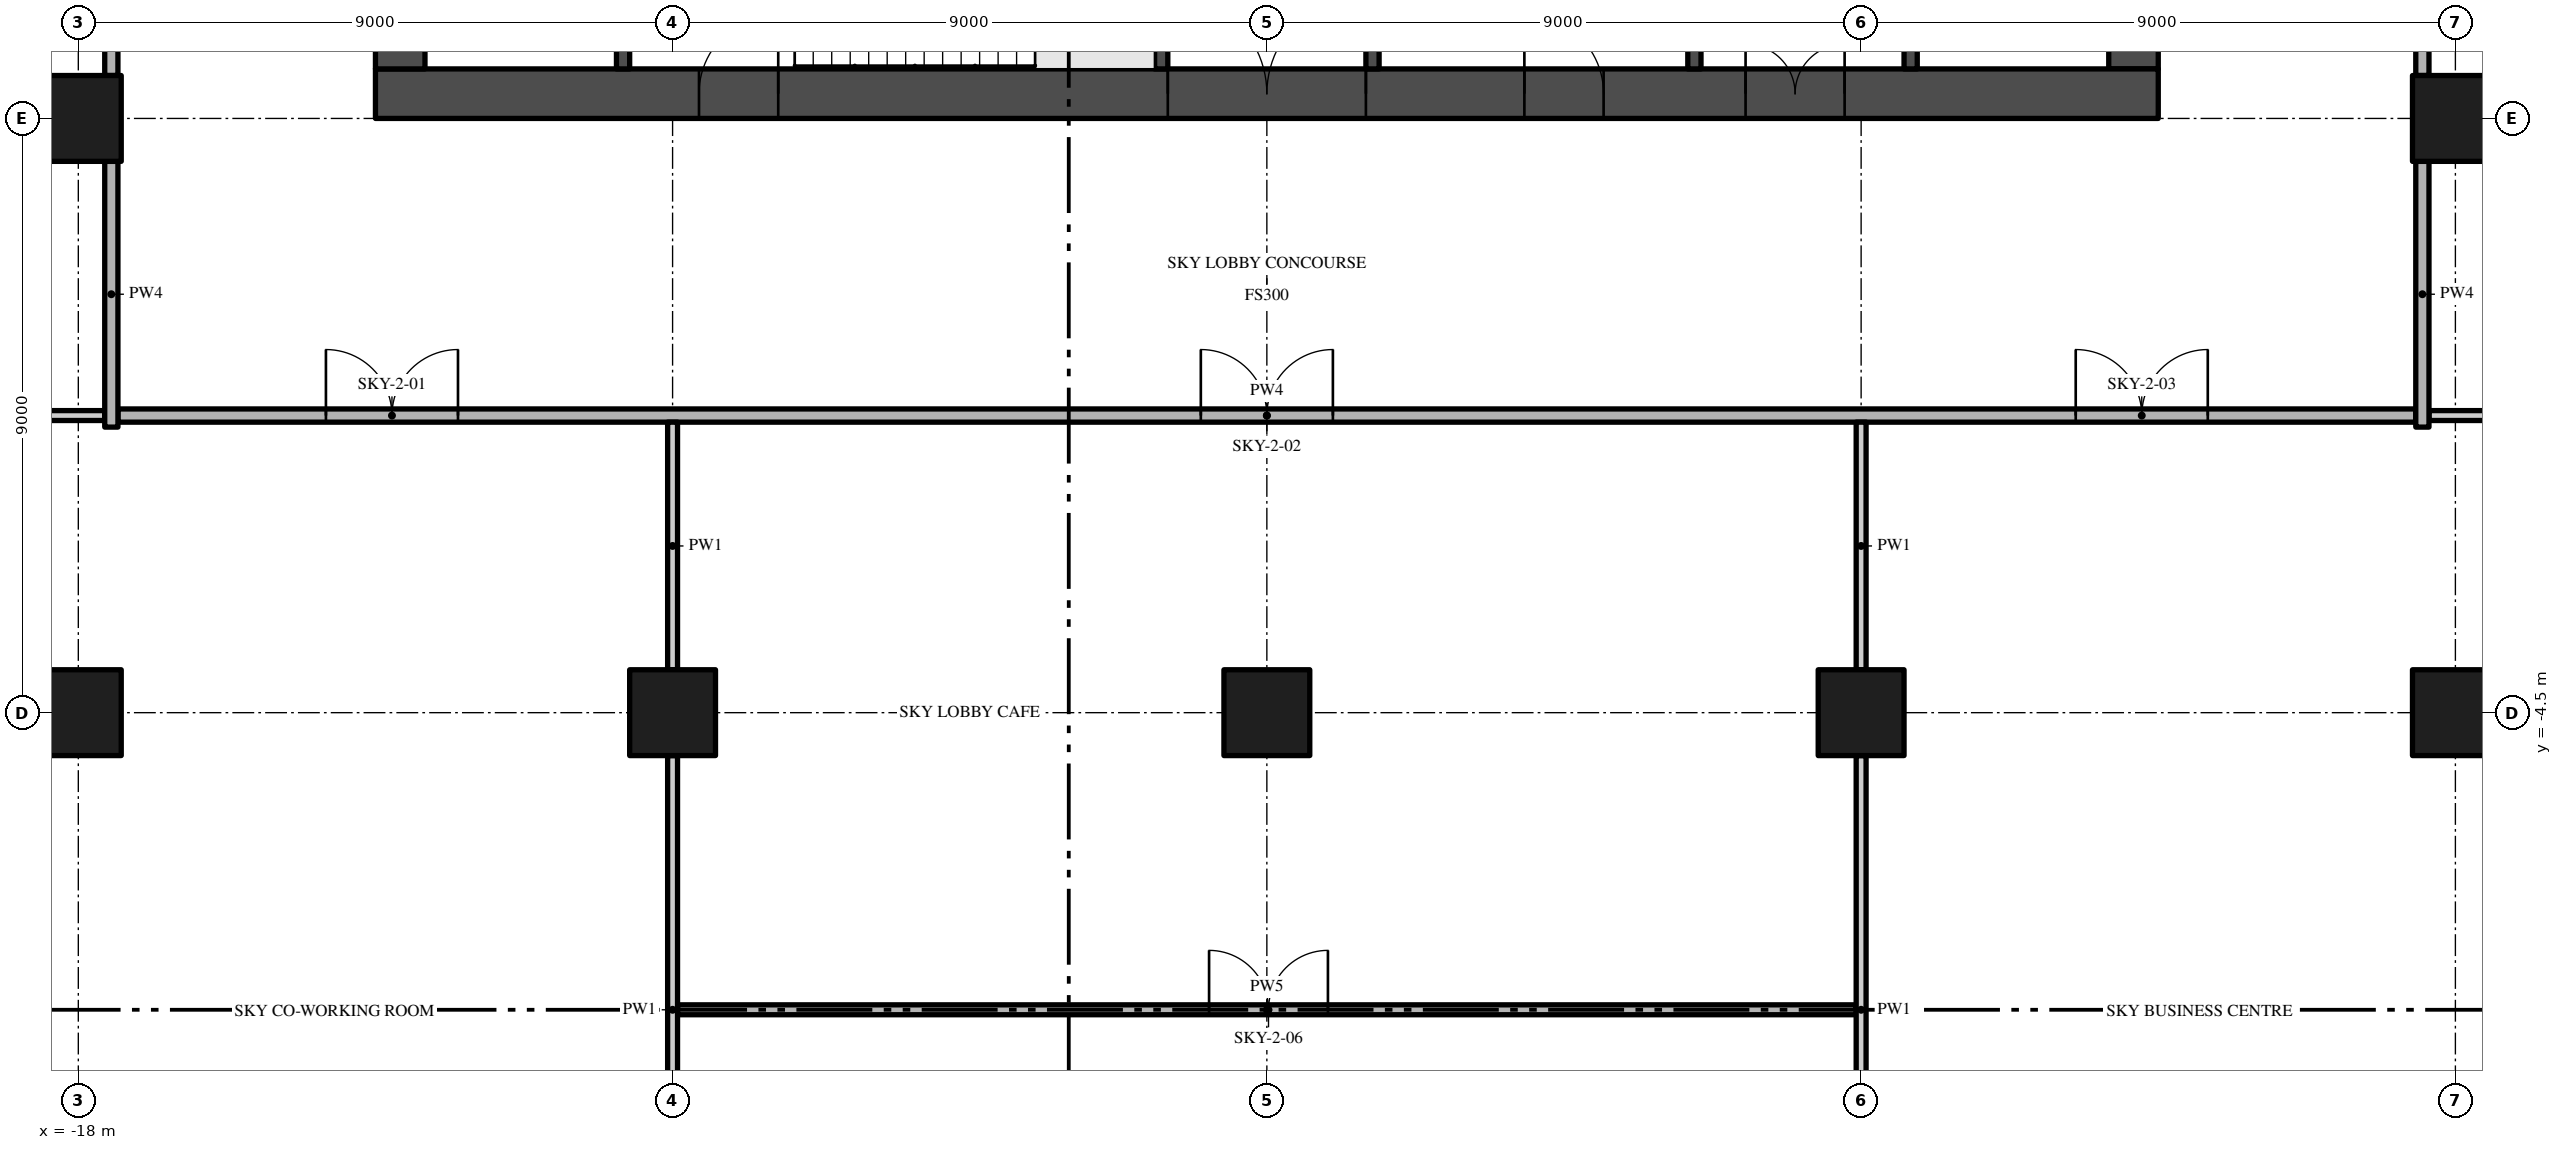
"""IFC4 building model, lengths in metres.
Left out: names, types, materials, properties, quantities, classifications, styles, units other than length and angle.
Written with IfcOpenShell. Run it as: python <this file> out.ifc"""

import sys

from ifc_helpers import new_model, si_unit, direction, frame, frame_2d, origin, origin_2d, place, context, subcontext, project, spatial, rectangle, extrude, element, fill, save


model = new_model("IFC4")
c1 = context("Model", 3, precision=1e-05, world=origin(), true_north=direction((0.0, 1.0)))
c2 = subcontext(c1, "Body", "Model", "MODEL_VIEW")
j1 = project(units=[si_unit("LENGTHUNIT", "METRE"), si_unit("PLANEANGLEUNIT", "RADIAN")], contexts=[c1])
p1 = place(None, origin())
s1 = spatial("IfcSite", under=j1, at=p1, CompositionType="ELEMENT")
p2 = place(p1, origin())
s2 = spatial("IfcBuilding", under=s1, at=p2, CompositionType="ELEMENT")
p3 = place(p2, frame((0.0, 0.0, 120.0)))
s3 = spatial("IfcBuildingStorey", under=s2, at=p3, CompositionType="ELEMENT", Elevation=120.0)
p4 = place(p3, frame((-13.5, 4.875, -0.3), z_axis=(0.0, 0.0, 1.0), x_axis=(1.0, 0.0, 0.0)))
e1 = element("IfcWall", 1, at=p4, inside=s3, PredefinedType="SHEAR", context=c2, shape_type="SweptSolid", body=[
    extrude(rectangle(XDim=27.0, YDim=0.75, at=frame_2d((13.5, 0.0))), origin(), (0.0, 0.0, 1.0), 5.0),
])
p5 = place(p4, frame((12.0, 0.0, 0.3)))
e2 = element("IfcOpeningElement", 2, at=p5, cuts=e1, PredefinedType="OPENING", context=c2, shape_type="SweptSolid", body=[
    extrude(rectangle(XDim=3.0, YDim=2.4, at=frame_2d((1.5, 1.2))), frame((0.0, 0.385, 0.0), z_axis=(0.0, -1.0, 0.0), x_axis=(1.0, 0.0, 0.0)), (0.0, 0.0, 1.0), 0.77),
])
p6 = place(p4, frame((4.9, 0.0, 0.3)))
e3 = element("IfcOpeningElement", 3, at=p6, cuts=e1, PredefinedType="OPENING", context=c2, shape_type="SweptSolid", body=[
    extrude(rectangle(XDim=1.2, YDim=2.2, at=frame_2d((0.6, 1.1))), frame((0.0, 0.385, 0.0), z_axis=(0.0, -1.0, 0.0), x_axis=(1.0, 0.0, 0.0)), (0.0, 0.0, 1.0), 0.77),
])
p7 = place(p4, frame((20.75, 0.0, 0.3)))
e4 = element("IfcOpeningElement", 4, at=p7, cuts=e1, PredefinedType="OPENING", context=c2, shape_type="SweptSolid", body=[
    extrude(rectangle(XDim=1.5, YDim=2.2, at=frame_2d((0.75, 1.1))), frame((0.0, 0.385, 0.0), z_axis=(0.0, -1.0, 0.0), x_axis=(1.0, 0.0, 0.0)), (0.0, 0.0, 1.0), 0.77),
])
p8 = place(p4, frame((17.4, 0.0, 0.3)))
e5 = element("IfcOpeningElement", 5, at=p8, cuts=e1, PredefinedType="OPENING", context=c2, shape_type="SweptSolid", body=[
    extrude(rectangle(XDim=1.2, YDim=2.2, at=frame_2d((0.6, 1.1))), frame((0.0, 0.385, 0.0), z_axis=(0.0, -1.0, 0.0), x_axis=(1.0, 0.0, 0.0)), (0.0, 0.0, 1.0), 0.77),
])
p9 = place(p3, frame((13.125, 5.25, -0.3), z_axis=(0.0, 0.0, 1.0), x_axis=(0.0, 1.0, 0.0)))
e6 = element("IfcWall", 6, at=p9, inside=s3, PredefinedType="SHEAR", context=c2, shape_type="SweptSolid", body=[
    extrude(rectangle(XDim=16.5, YDim=0.75, at=frame_2d((8.25, 0.0))), origin(), (0.0, 0.0, 1.0), 5.0),
])
p10 = place(p9, frame((6.15, 0.0, 0.3)))
e7 = element("IfcOpeningElement", 7, at=p10, cuts=e6, PredefinedType="OPENING", context=c2, shape_type="SweptSolid", body=[
    extrude(rectangle(XDim=1.2, YDim=2.2, at=frame_2d((0.6, 1.1))), frame((0.0, 0.385, 0.0), z_axis=(0.0, -1.0, 0.0), x_axis=(1.0, 0.0, 0.0)), (0.0, 0.0, 1.0), 0.77),
])
p11 = place(p3, frame((-13.125, 21.75, -0.3), z_axis=(0.0, 0.0, 1.0), x_axis=(0.0, -1.0, 0.0)))
e8 = element("IfcWall", 8, at=p11, inside=s3, PredefinedType="SHEAR", context=c2, shape_type="SweptSolid", body=[
    extrude(rectangle(XDim=16.5, YDim=0.75, at=frame_2d((8.25, 0.0))), origin(), (0.0, 0.0, 1.0), 5.0),
])
p12 = place(p11, frame((9.15, 0.0, 0.3)))
e9 = element("IfcOpeningElement", 9, at=p12, cuts=e8, PredefinedType="OPENING", context=c2, shape_type="SweptSolid", body=[
    extrude(rectangle(XDim=1.2, YDim=2.2, at=frame_2d((0.6, 1.1))), frame((0.0, 0.385, 0.0), z_axis=(0.0, -1.0, 0.0), x_axis=(1.0, 0.0, 0.0)), (0.0, 0.0, 1.0), 0.77),
])
for number, where, z_axis, x_axis in (
    (10, (-18.0, -4.5, 0.0), (0.0, 0.0, 1.0), (1.0, 0.0, 0.0)),
    (11, (-18.0, 4.5, 0.0), (0.0, 0.0, 1.0), (1.0, 0.0, 0.0)),
    (12, (-9.0, -4.5, 0.0), (0.0, 0.0, 1.0), (1.0, 0.0, 0.0)),
    (13, (0.0, -4.5, 0.0), (0.0, 0.0, 1.0), (1.0, 0.0, 0.0)),
    (14, (18.0, -4.5, 0.0), (0.0, 0.0, 1.0), (1.0, 0.0, 0.0)),
    (15, (18.0, 4.5, 0.0), (0.0, 0.0, 1.0), (1.0, 0.0, 0.0)),
    (16, (9.0, -4.5, 0.0), (0.0, 0.0, 1.0), (1.0, 0.0, 0.0)),
):
    element("IfcColumn", number, at=place(p3, frame(where, z_axis=z_axis, x_axis=x_axis)), inside=s3, PredefinedType="COLUMN", context=c2, shape_type="SweptSolid", body=[
        extrude(rectangle(XDim=1.3, YDim=1.3, at=origin_2d()), origin(), (0.0, 0.0, 1.0), 4.7),
    ])
for number, where, z_axis, x_axis in (
    (17, (-9.75, 5.25, 0.0), (0.0, 0.0, 1.0), (0.0, 1.0, 0.0)),
    (18, (-1.6, 5.25, 0.0), (0.0, 0.0, 1.0), (0.0, 1.0, 0.0)),
):
    element("IfcWall", number, at=place(p3, frame(where, z_axis=z_axis, x_axis=x_axis)), inside=s3, PredefinedType="SHEAR", context=c2, shape_type="SweptSolid", body=[
        extrude(rectangle(XDim=2.7, YDim=0.2, at=frame_2d((1.35, 0.0))), origin(), (0.0, 0.0, 1.0), 4.7),
    ])
p13 = place(p3, frame((1.6, 9.2, 0.0), z_axis=(0.0, 0.0, 1.0), x_axis=(0.0, -1.0, 0.0)))
e19 = element("IfcWall", 19, at=p13, inside=s3, PredefinedType="SHEAR", context=c2, shape_type="SweptSolid", body=[
    extrude(rectangle(XDim=3.95, YDim=0.2, at=frame_2d((1.975, 0.0))), origin(), (0.0, 0.0, 1.0), 4.7),
])
p14 = place(p13, frame((1.125, 0.0, 0.0)))
e20 = element("IfcOpeningElement", 20, at=p14, cuts=e19, PredefinedType="OPENING", context=c2, shape_type="SweptSolid", body=[
    extrude(rectangle(XDim=0.9, YDim=2.1, at=frame_2d((0.45, 1.05))), frame((0.0, 0.11, 0.0), z_axis=(0.0, -1.0, 0.0), x_axis=(1.0, 0.0, 0.0)), (0.0, 0.0, 1.0), 0.22),
])
p15 = place(p3, frame((6.475, 5.25, 0.0), z_axis=(0.0, 0.0, 1.0), x_axis=(0.0, 1.0, 0.0)))
e21 = element("IfcWall", 21, at=p15, inside=s3, PredefinedType="SHEAR", context=c2, shape_type="SweptSolid", body=[
    extrude(rectangle(XDim=3.95, YDim=0.2, at=frame_2d((1.975, 0.0))), origin(), (0.0, 0.0, 1.0), 4.7),
])
p16 = place(p3, frame((9.75, 5.25, 0.0), z_axis=(0.0, 0.0, 1.0), x_axis=(0.0, 1.0, 0.0)))
e22 = element("IfcWall", 22, at=p16, inside=s3, PredefinedType="SHEAR", context=c2, shape_type="SweptSolid", body=[
    extrude(rectangle(XDim=2.35, YDim=0.2, at=frame_2d((1.175, 0.0))), origin(), (0.0, 0.0, 1.0), 4.7),
])
p17 = place(p16, frame((0.7, 0.0, 0.0)))
e23 = element("IfcOpeningElement", 23, at=p17, cuts=e22, PredefinedType="OPENING", context=c2, shape_type="SweptSolid", body=[
    extrude(rectangle(XDim=1.1, YDim=2.1, at=frame_2d((0.55, 1.05))), frame((0.0, 0.11, 0.0), z_axis=(0.0, -1.0, 0.0), x_axis=(1.0, 0.0, 0.0)), (0.0, 0.0, 1.0), 0.22),
])
p18 = place(p3, frame((-8.925, -9.0, 0.0), z_axis=(0.0, 0.0, 1.0), x_axis=(1.0, 0.0, 0.0)))
e24 = element("IfcWall", 24, at=p18, inside=s3, PredefinedType="PARTITIONING", context=c2, shape_type="SweptSolid", body=[
    extrude(rectangle(XDim=17.85, YDim=0.15, at=frame_2d((8.925, 0.0))), origin(), (0.0, 0.0, 1.0), 4.7),
])
p19 = place(p18, frame((8.05, 0.0, 0.0)))
e25 = element("IfcOpeningElement", 25, at=p19, cuts=e24, PredefinedType="OPENING", context=c2, shape_type="SweptSolid", body=[
    extrude(rectangle(XDim=1.8, YDim=2.4, at=frame_2d((0.9, 1.2))), frame((0.0, 0.085, 0.0), z_axis=(0.0, -1.0, 0.0), x_axis=(1.0, 0.0, 0.0)), (0.0, 0.0, 1.0), 0.17),
])
p20 = place(p3, frame((-17.4, 0.0, 0.0), z_axis=(0.0, 0.0, 1.0), x_axis=(1.0, 0.0, 0.0)))
e26 = element("IfcWall", 26, at=p20, inside=s3, PredefinedType="PARTITIONING", context=c2, shape_type="SweptSolid", body=[
    extrude(rectangle(XDim=34.8, YDim=0.2, at=frame_2d((17.4, 0.0))), origin(), (0.0, 0.0, 1.0), 4.7),
])
p21 = place(p20, frame((3.15, 0.0, 0.0)))
e27 = element("IfcOpeningElement", 27, at=p21, cuts=e26, PredefinedType="OPENING", context=c2, shape_type="SweptSolid", body=[
    extrude(rectangle(XDim=2.0, YDim=2.4, at=frame_2d((1.0, 1.2))), frame((0.0, 0.11, 0.0), z_axis=(0.0, -1.0, 0.0), x_axis=(1.0, 0.0, 0.0)), (0.0, 0.0, 1.0), 0.22),
])
p22 = place(p20, frame((16.4, 0.0, 0.0)))
e28 = element("IfcOpeningElement", 28, at=p22, cuts=e26, PredefinedType="OPENING", context=c2, shape_type="SweptSolid", body=[
    extrude(rectangle(XDim=2.0, YDim=2.4, at=frame_2d((1.0, 1.2))), frame((0.0, 0.11, 0.0), z_axis=(0.0, -1.0, 0.0), x_axis=(1.0, 0.0, 0.0)), (0.0, 0.0, 1.0), 0.22),
])
p23 = place(p20, frame((29.65, 0.0, 0.0)))
e29 = element("IfcOpeningElement", 29, at=p23, cuts=e26, PredefinedType="OPENING", context=c2, shape_type="SweptSolid", body=[
    extrude(rectangle(XDim=2.0, YDim=2.4, at=frame_2d((1.0, 1.2))), frame((0.0, 0.11, 0.0), z_axis=(0.0, -1.0, 0.0), x_axis=(1.0, 0.0, 0.0)), (0.0, 0.0, 1.0), 0.22),
])
for number, where, z_axis, x_axis in (
    (30, (-22.2, 0.0, 0.0), (0.0, 0.0, 1.0), (1.0, 0.0, 0.0)),
    (31, (17.6, 0.0, 0.0), (0.0, 0.0, 1.0), (1.0, 0.0, 0.0)),
):
    element("IfcWall", number, at=place(p3, frame(where, z_axis=z_axis, x_axis=x_axis)), inside=s3, PredefinedType="PARTITIONING", context=c2, shape_type="SweptSolid", body=[
        extrude(rectangle(XDim=4.6, YDim=0.15, at=frame_2d((2.3, 0.0))), origin(), (0.0, 0.0, 1.0), 4.7),
    ])
p24 = place(p3, frame((-17.5, -0.175, 0.0), z_axis=(0.0, 0.0, 1.0), x_axis=(0.0, 1.0, 0.0)))
e32 = element("IfcWall", 32, at=p24, inside=s3, PredefinedType="PARTITIONING", context=c2, shape_type="SweptSolid", body=[
    extrude(rectangle(XDim=4.025, YDim=0.2, at=frame_2d((2.013, 0.0))), origin(), (0.0, 0.0, 1.0), 4.7),
])
p25 = place(p3, frame((-17.5, 12.85, 0.0), z_axis=(0.0, 0.0, 1.0), x_axis=(0.0, -1.0, 0.0)))
e33 = element("IfcWall", 33, at=p25, inside=s3, PredefinedType="PARTITIONING", context=c2, shape_type="SweptSolid", body=[
    extrude(rectangle(XDim=7.7, YDim=0.2, at=frame_2d((3.85, 0.0))), origin(), (0.0, 0.0, 1.0), 4.7),
])
p26 = place(p25, frame((0.15, 0.0, 0.0)))
e34 = element("IfcOpeningElement", 34, at=p26, cuts=e33, PredefinedType="OPENING", context=c2, shape_type="SweptSolid", body=[
    extrude(rectangle(XDim=1.8, YDim=2.4, at=frame_2d((0.9, 1.2))), frame((0.0, 0.11, 0.0), z_axis=(0.0, -1.0, 0.0), x_axis=(1.0, 0.0, 0.0)), (0.0, 0.0, 1.0), 0.22),
])
p27 = place(p3, frame((-9.0, -12.85, 0.0), z_axis=(0.0, 0.0, 1.0), x_axis=(0.0, 1.0, 0.0)))
e35 = element("IfcWall", 35, at=p27, inside=s3, PredefinedType="PARTITIONING", context=c2, shape_type="SweptSolid", body=[
    extrude(rectangle(XDim=7.7, YDim=0.15, at=frame_2d((3.85, 0.0))), origin(), (0.0, 0.0, 1.0), 4.7),
])
p28 = place(p3, frame((-9.0, -3.85, 0.0), z_axis=(0.0, 0.0, 1.0), x_axis=(0.0, 1.0, 0.0)))
e36 = element("IfcWall", 36, at=p28, inside=s3, PredefinedType="PARTITIONING", context=c2, shape_type="SweptSolid", body=[
    extrude(rectangle(XDim=3.75, YDim=0.15, at=frame_2d((1.875, 0.0))), origin(), (0.0, 0.0, 1.0), 4.7),
])
p29 = place(p3, frame((9.0, -12.85, 0.0), z_axis=(0.0, 0.0, 1.0), x_axis=(0.0, 1.0, 0.0)))
e37 = element("IfcWall", 37, at=p29, inside=s3, PredefinedType="PARTITIONING", context=c2, shape_type="SweptSolid", body=[
    extrude(rectangle(XDim=7.7, YDim=0.15, at=frame_2d((3.85, 0.0))), origin(), (0.0, 0.0, 1.0), 4.7),
])
p30 = place(p3, frame((9.0, -3.85, 0.0), z_axis=(0.0, 0.0, 1.0), x_axis=(0.0, 1.0, 0.0)))
e38 = element("IfcWall", 38, at=p30, inside=s3, PredefinedType="PARTITIONING", context=c2, shape_type="SweptSolid", body=[
    extrude(rectangle(XDim=3.75, YDim=0.15, at=frame_2d((1.875, 0.0))), origin(), (0.0, 0.0, 1.0), 4.7),
])
p31 = place(p3, frame((17.5, -0.175, 0.0), z_axis=(0.0, 0.0, 1.0), x_axis=(0.0, 1.0, 0.0)))
e39 = element("IfcWall", 39, at=p31, inside=s3, PredefinedType="PARTITIONING", context=c2, shape_type="SweptSolid", body=[
    extrude(rectangle(XDim=4.025, YDim=0.2, at=frame_2d((2.013, 0.0))), origin(), (0.0, 0.0, 1.0), 4.7),
])
p32 = place(p3, frame((17.5, 5.15, 0.0), z_axis=(0.0, 0.0, 1.0), x_axis=(0.0, 1.0, 0.0)))
e40 = element("IfcWall", 40, at=p32, inside=s3, PredefinedType="PARTITIONING", context=c2, shape_type="SweptSolid", body=[
    extrude(rectangle(XDim=7.7, YDim=0.2, at=frame_2d((3.85, 0.0))), origin(), (0.0, 0.0, 1.0), 4.7),
])
p33 = place(p32, frame((5.75, 0.0, 0.0)))
e41 = element("IfcOpeningElement", 41, at=p33, cuts=e40, PredefinedType="OPENING", context=c2, shape_type="SweptSolid", body=[
    extrude(rectangle(XDim=1.8, YDim=2.4, at=frame_2d((0.9, 1.2))), frame((0.0, 0.11, 0.0), z_axis=(0.0, -1.0, 0.0), x_axis=(1.0, 0.0, 0.0)), (0.0, 0.0, 1.0), 0.22),
])
p34 = place(p5, frame((3.0, 0.0, 0.0), z_axis=(0.0, 0.0, 1.0), x_axis=(-1.0, 0.0, 0.0)))
e42 = element("IfcDoor", 42, at=p34, inside=s3, OperationType="DOUBLE_DOOR_SINGLE_SWING", PredefinedType="DOOR", context=c2, shape_type="SweptSolid", body=[
    extrude(rectangle(XDim=3.0, YDim=2.4, at=frame_2d((1.5, 1.2))), frame((0.0, 0.025, 0.0), z_axis=(0.0, -1.0, 0.0), x_axis=(1.0, 0.0, 0.0)), (0.0, 0.0, 1.0), 0.05),
])
fill(e2, e42)
p35 = place(p6, frame((1.2, 0.0, 0.0), z_axis=(0.0, 0.0, 1.0), x_axis=(-1.0, 0.0, 0.0)))
e43 = element("IfcDoor", 43, at=p35, inside=s3, OperationType="SINGLE_SWING_LEFT", PredefinedType="DOOR", context=c2, shape_type="SweptSolid", body=[
    extrude(rectangle(XDim=1.2, YDim=2.2, at=frame_2d((0.6, 1.1))), frame((0.0, 0.025, 0.0), z_axis=(0.0, -1.0, 0.0), x_axis=(1.0, 0.0, 0.0)), (0.0, 0.0, 1.0), 0.05),
])
fill(e3, e43)
p36 = place(p7, frame((1.5, 0.0, 0.0), z_axis=(0.0, 0.0, 1.0), x_axis=(-1.0, 0.0, 0.0)))
e44 = element("IfcDoor", 44, at=p36, inside=s3, OperationType="DOUBLE_DOOR_SINGLE_SWING", PredefinedType="DOOR", context=c2, shape_type="SweptSolid", body=[
    extrude(rectangle(XDim=1.5, YDim=2.2, at=frame_2d((0.75, 1.1))), frame((0.0, 0.025, 0.0), z_axis=(0.0, -1.0, 0.0), x_axis=(1.0, 0.0, 0.0)), (0.0, 0.0, 1.0), 0.05),
])
fill(e4, e44)
p37 = place(p8, frame((1.2, 0.0, 0.0), z_axis=(0.0, 0.0, 1.0), x_axis=(-1.0, 0.0, 0.0)))
e45 = element("IfcDoor", 45, at=p37, inside=s3, OperationType="SINGLE_SWING_RIGHT", PredefinedType="DOOR", context=c2, shape_type="SweptSolid", body=[
    extrude(rectangle(XDim=1.2, YDim=2.2, at=frame_2d((0.6, 1.1))), frame((0.0, 0.025, 0.0), z_axis=(0.0, -1.0, 0.0), x_axis=(1.0, 0.0, 0.0)), (0.0, 0.0, 1.0), 0.05),
])
fill(e5, e45)
p38 = place(p21, origin())
e46 = element("IfcDoor", 46, at=p38, inside=s3, OperationType="DOUBLE_DOOR_SINGLE_SWING", PredefinedType="DOOR", context=c2, shape_type="SweptSolid", body=[
    extrude(rectangle(XDim=2.0, YDim=2.4, at=frame_2d((1.0, 1.2))), frame((0.0, 0.025, 0.0), z_axis=(0.0, -1.0, 0.0), x_axis=(1.0, 0.0, 0.0)), (0.0, 0.0, 1.0), 0.05),
])
fill(e27, e46)
p39 = place(p22, origin())
e47 = element("IfcDoor", 47, at=p39, inside=s3, OperationType="DOUBLE_DOOR_SINGLE_SWING", PredefinedType="DOOR", context=c2, shape_type="SweptSolid", body=[
    extrude(rectangle(XDim=2.0, YDim=2.4, at=frame_2d((1.0, 1.2))), frame((0.0, 0.025, 0.0), z_axis=(0.0, -1.0, 0.0), x_axis=(1.0, 0.0, 0.0)), (0.0, 0.0, 1.0), 0.05),
])
fill(e28, e47)
p40 = place(p23, origin())
e48 = element("IfcDoor", 48, at=p40, inside=s3, OperationType="DOUBLE_DOOR_SINGLE_SWING", PredefinedType="DOOR", context=c2, shape_type="SweptSolid", body=[
    extrude(rectangle(XDim=2.0, YDim=2.4, at=frame_2d((1.0, 1.2))), frame((0.0, 0.025, 0.0), z_axis=(0.0, -1.0, 0.0), x_axis=(1.0, 0.0, 0.0)), (0.0, 0.0, 1.0), 0.05),
])
fill(e29, e48)
p41 = place(p19, origin())
e49 = element("IfcDoor", 49, at=p41, inside=s3, OperationType="DOUBLE_DOOR_SINGLE_SWING", PredefinedType="DOOR", context=c2, shape_type="SweptSolid", body=[
    extrude(rectangle(XDim=1.8, YDim=2.4, at=frame_2d((0.9, 1.2))), frame((0.0, 0.025, 0.0), z_axis=(0.0, -1.0, 0.0), x_axis=(1.0, 0.0, 0.0)), (0.0, 0.0, 1.0), 0.05),
])
fill(e25, e49)
save(model, sys.argv[1])
